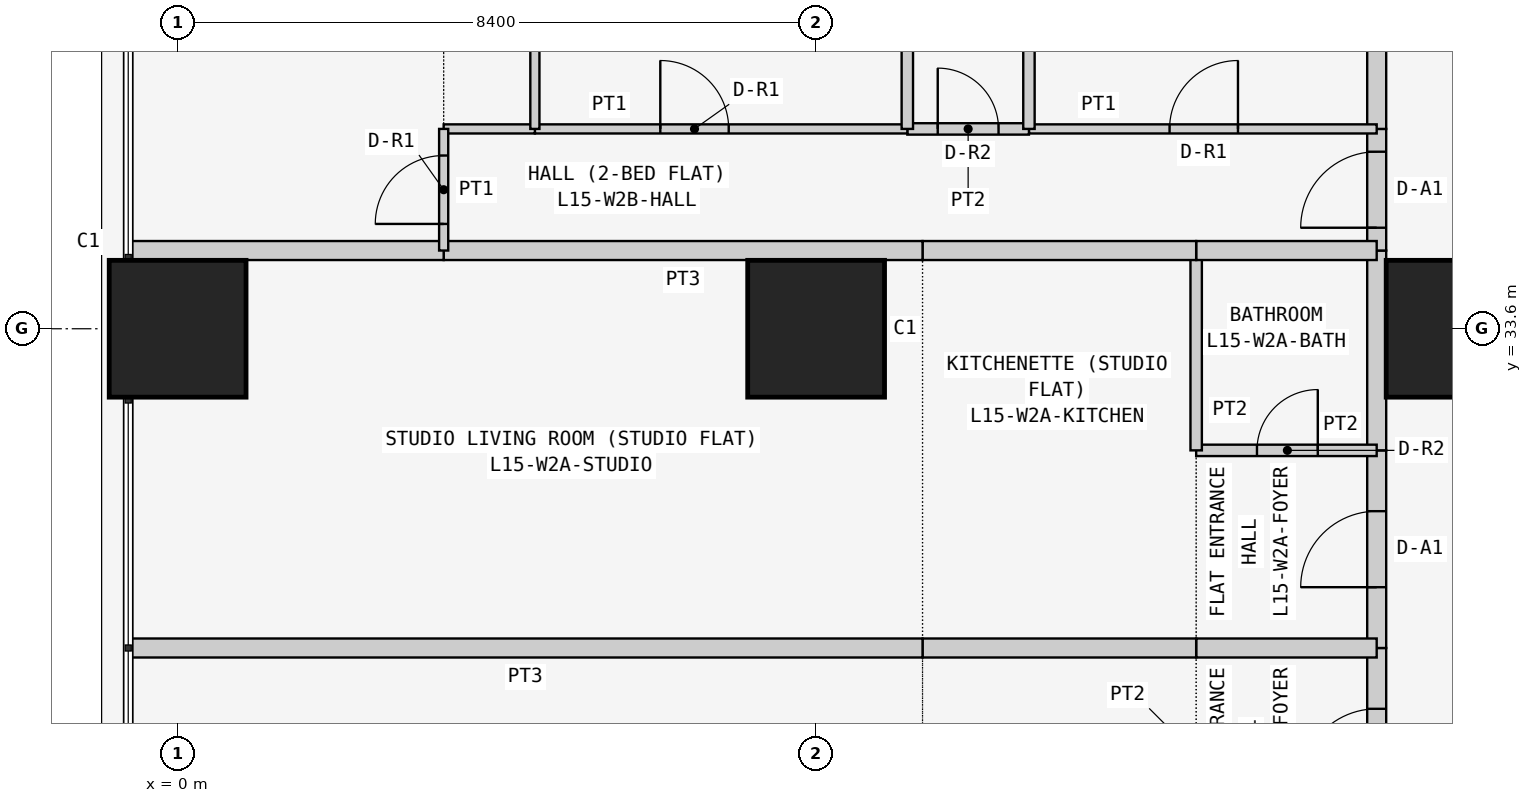
"""IFC4 building model, lengths in metres.
Left out: names, types, materials, properties, quantities, classifications, styles, units other than length and angle.
Written with IfcOpenShell. Run it as: python <this file> out.ifc"""

import sys

from ifc_helpers import new_model, si_unit, direction, frame, frame_2d, origin, origin_2d, place, context, subcontext, project, spatial, rectangle, extrude, element, fill, save


model = new_model("IFC4")
c1 = context("Model", 3, precision=1e-05, world=origin(), true_north=direction((0.0, 1.0)))
c2 = subcontext(c1, "Body", "Model", "MODEL_VIEW")
j1 = project(units=[si_unit("LENGTHUNIT", "METRE"), si_unit("PLANEANGLEUNIT", "RADIAN")], contexts=[c1])
p1 = place(None, origin())
s1 = spatial("IfcSite", under=j1, at=p1, CompositionType="ELEMENT")
p2 = place(p1, origin())
s2 = spatial("IfcBuilding", under=s1, at=p2, CompositionType="ELEMENT")
p3 = place(p2, frame((0.0, 0.0, 63.3)))
s3 = spatial("IfcBuildingStorey", under=s2, at=p3, CompositionType="ELEMENT", Elevation=63.3)
for number, where, z_axis, x_axis in (
    (1, (0.0, 33.6, 0.0), (0.0, 0.0, 1.0), (1.0, 0.0, 0.0)),
    (2, (8.4, 33.6, 0.0), (0.0, 0.0, 1.0), (1.0, 0.0, 0.0)),
    (3, (16.8, 33.6, 0.0), (0.0, 0.0, 1.0), (1.0, 0.0, 0.0)),
):
    element("IfcColumn", number, at=place(p3, frame(where, z_axis=z_axis, x_axis=x_axis)), inside=s3, PredefinedType="COLUMN", context=c2, shape_type="SweptSolid", body=[
        extrude(rectangle(XDim=1.8, YDim=1.8, at=origin_2d()), origin(), (0.0, 0.0, 1.0), 3.6),
    ])
p4 = place(p3, frame((15.775, 26.8, 0.0), z_axis=(0.0, 0.0, 1.0), x_axis=(0.0, 1.0, 0.0)))
e4 = element("IfcWall", 4, at=p4, inside=s3, PredefinedType="PARTITIONING", context=c2, shape_type="SweptSolid", body=[
    extrude(rectangle(XDim=2.6, YDim=0.25, at=frame_2d((1.3, 0.0))), origin(), (0.0, 0.0, 1.0), 3.45),
])
p5 = place(p4, frame((0.8, 0.0, 0.0)))
e5 = element("IfcOpeningElement", 5, at=p5, cuts=e4, PredefinedType="OPENING", context=c2, shape_type="SweptSolid", body=[
    extrude(rectangle(XDim=1.0, YDim=2.1, at=frame_2d((0.5, 1.05))), frame((0.0, 0.135, 0.0), z_axis=(0.0, -1.0, 0.0), x_axis=(1.0, 0.0, 0.0)), (0.0, 0.0, 1.0), 0.27),
])
p6 = place(p3, frame((15.775, 29.4, 0.0), z_axis=(0.0, 0.0, 1.0), x_axis=(0.0, 1.0, 0.0)))
e6 = element("IfcWall", 6, at=p6, inside=s3, PredefinedType="PARTITIONING", context=c2, shape_type="SweptSolid", body=[
    extrude(rectangle(XDim=2.6, YDim=0.25, at=frame_2d((1.3, 0.0))), origin(), (0.0, 0.0, 1.0), 3.45),
])
p7 = place(p6, frame((0.8, 0.0, 0.0)))
e7 = element("IfcOpeningElement", 7, at=p7, cuts=e6, PredefinedType="OPENING", context=c2, shape_type="SweptSolid", body=[
    extrude(rectangle(XDim=1.0, YDim=2.1, at=frame_2d((0.5, 1.05))), frame((0.0, 0.135, 0.0), z_axis=(0.0, -1.0, 0.0), x_axis=(1.0, 0.0, 0.0)), (0.0, 0.0, 1.0), 0.27),
])
p8 = place(p3, frame((15.775, 32.0, 0.0), z_axis=(0.0, 0.0, 1.0), x_axis=(0.0, 1.0, 0.0)))
e8 = element("IfcWall", 8, at=p8, inside=s3, PredefinedType="PARTITIONING", context=c2, shape_type="SweptSolid", body=[
    extrude(rectangle(XDim=2.629, YDim=0.25, at=frame_2d((1.314, 0.0))), origin(), (0.0, 0.0, 1.0), 3.45),
])
p9 = place(p3, frame((15.775, 34.629, 0.0), z_axis=(0.0, 0.0, 1.0), x_axis=(0.0, 1.0, 0.0)))
e9 = element("IfcWall", 9, at=p9, inside=s3, PredefinedType="PARTITIONING", context=c2, shape_type="SweptSolid", body=[
    extrude(rectangle(XDim=1.6, YDim=0.25, at=frame_2d((0.8, 0.0))), origin(), (0.0, 0.0, 1.0), 3.45),
])
p10 = place(p9, frame((0.3, 0.0, 0.0)))
e10 = element("IfcOpeningElement", 10, at=p10, cuts=e9, PredefinedType="OPENING", context=c2, shape_type="SweptSolid", body=[
    extrude(rectangle(XDim=1.0, YDim=2.1, at=frame_2d((0.5, 1.05))), frame((0.0, 0.135, 0.0), z_axis=(0.0, -1.0, 0.0), x_axis=(1.0, 0.0, 0.0)), (0.0, 0.0, 1.0), 0.27),
])
p11 = place(p3, frame((15.775, 36.229, 0.0), z_axis=(0.0, 0.0, 1.0), x_axis=(0.0, 1.0, 0.0)))
e11 = element("IfcWall", 11, at=p11, inside=s3, PredefinedType="PARTITIONING", context=c2, shape_type="SweptSolid", body=[
    extrude(rectangle(XDim=6.471, YDim=0.25, at=frame_2d((3.235, 0.0))), origin(), (0.0, 0.0, 1.0), 3.45),
])
p12 = place(p3, frame((15.775, 29.4, 0.0), z_axis=(0.0, 0.0, 1.0), x_axis=(-1.0, 0.0, 0.0)))
e12 = element("IfcWall", 12, at=p12, inside=s3, PredefinedType="PARTITIONING", context=c2, shape_type="SweptSolid", body=[
    extrude(rectangle(XDim=2.375, YDim=0.25, at=frame_2d((1.188, 0.0))), origin(), (0.0, 0.0, 1.0), 3.45),
])
p13 = place(p3, frame((13.4, 29.4, 0.0), z_axis=(0.0, 0.0, 1.0), x_axis=(-1.0, 0.0, 0.0)))
e13 = element("IfcWall", 13, at=p13, inside=s3, PredefinedType="PARTITIONING", context=c2, shape_type="SweptSolid", body=[
    extrude(rectangle(XDim=3.6, YDim=0.25, at=frame_2d((1.8, 0.0))), origin(), (0.0, 0.0, 1.0), 3.45),
])
p14 = place(p3, frame((9.8, 29.4, 0.0), z_axis=(0.0, 0.0, 1.0), x_axis=(-1.0, 0.0, 0.0)))
e14 = element("IfcWall", 14, at=p14, inside=s3, PredefinedType="PARTITIONING", context=c2, shape_type="SweptSolid", body=[
    extrude(rectangle(XDim=10.45, YDim=0.25, at=frame_2d((5.225, 0.0))), origin(), (0.0, 0.0, 1.0), 3.45),
])
p15 = place(p3, frame((13.4, 32.0, 0.0), z_axis=(0.0, 0.0, 1.0), x_axis=(1.0, 0.0, 0.0)))
e15 = element("IfcWall", 15, at=p15, inside=s3, PredefinedType="PARTITIONING", context=c2, shape_type="SweptSolid", body=[
    extrude(rectangle(XDim=2.375, YDim=0.15, at=frame_2d((1.188, 0.0))), origin(), (0.0, 0.0, 1.0), 3.45),
])
p16 = place(p15, frame((0.8, 0.0, 0.0)))
e16 = element("IfcOpeningElement", 16, at=p16, cuts=e15, PredefinedType="OPENING", context=c2, shape_type="SweptSolid", body=[
    extrude(rectangle(XDim=0.8, YDim=2.1, at=frame_2d((0.4, 1.05))), frame((0.0, 0.085, 0.0), z_axis=(0.0, -1.0, 0.0), x_axis=(1.0, 0.0, 0.0)), (0.0, 0.0, 1.0), 0.17),
])
p17 = place(p3, frame((13.4, 32.0, 0.0), z_axis=(0.0, 0.0, 1.0), x_axis=(0.0, 1.0, 0.0)))
e17 = element("IfcWall", 17, at=p17, inside=s3, PredefinedType="PARTITIONING", context=c2, shape_type="SweptSolid", body=[
    extrude(rectangle(XDim=2.629, YDim=0.15, at=frame_2d((1.314, 0.0))), origin(), (0.0, 0.0, 1.0), 3.45),
])
p18 = place(p3, frame((13.4, 34.629, 0.0), z_axis=(0.0, 0.0, 1.0), x_axis=(1.0, 0.0, 0.0)))
e18 = element("IfcWall", 18, at=p18, inside=s3, PredefinedType="PARTITIONING", context=c2, shape_type="SweptSolid", body=[
    extrude(rectangle(XDim=2.375, YDim=0.25, at=frame_2d((1.188, 0.0))), origin(), (0.0, 0.0, 1.0), 3.45),
])
p19 = place(p3, frame((9.8, 34.629, 0.0), z_axis=(0.0, 0.0, 1.0), x_axis=(1.0, 0.0, 0.0)))
e19 = element("IfcWall", 19, at=p19, inside=s3, PredefinedType="PARTITIONING", context=c2, shape_type="SweptSolid", body=[
    extrude(rectangle(XDim=3.6, YDim=0.25, at=frame_2d((1.8, 0.0))), origin(), (0.0, 0.0, 1.0), 3.45),
])
p20 = place(p3, frame((3.5, 34.629, 0.0), z_axis=(0.0, 0.0, 1.0), x_axis=(1.0, 0.0, 0.0)))
e20 = element("IfcWall", 20, at=p20, inside=s3, PredefinedType="PARTITIONING", context=c2, shape_type="SweptSolid", body=[
    extrude(rectangle(XDim=6.3, YDim=0.25, at=frame_2d((3.15, 0.0))), origin(), (0.0, 0.0, 1.0), 3.45),
])
p21 = place(p3, frame((-0.65, 34.629, 0.0), z_axis=(0.0, 0.0, 1.0), x_axis=(1.0, 0.0, 0.0)))
e21 = element("IfcWall", 21, at=p21, inside=s3, PredefinedType="PARTITIONING", context=c2, shape_type="SweptSolid", body=[
    extrude(rectangle(XDim=4.15, YDim=0.25, at=frame_2d((2.075, 0.0))), origin(), (0.0, 0.0, 1.0), 3.45),
])
p22 = place(p3, frame((11.2, 36.229, 0.0), z_axis=(0.0, 0.0, 1.0), x_axis=(1.0, 0.0, 0.0)))
e22 = element("IfcWall", 22, at=p22, inside=s3, PredefinedType="PARTITIONING", context=c2, shape_type="SweptSolid", body=[
    extrude(rectangle(XDim=4.575, YDim=0.12, at=frame_2d((2.288, 0.0))), origin(), (0.0, 0.0, 1.0), 3.45),
])
p23 = place(p22, frame((1.85, 0.0, 0.0)))
e23 = element("IfcOpeningElement", 23, at=p23, cuts=e22, PredefinedType="OPENING", context=c2, shape_type="SweptSolid", body=[
    extrude(rectangle(XDim=0.9, YDim=2.1, at=frame_2d((0.45, 1.05))), frame((0.0, 0.07, 0.0), z_axis=(0.0, -1.0, 0.0), x_axis=(1.0, 0.0, 0.0)), (0.0, 0.0, 1.0), 0.14),
])
p24 = place(p3, frame((9.6, 36.229, 0.0), z_axis=(0.0, 0.0, 1.0), x_axis=(1.0, 0.0, 0.0)))
e24 = element("IfcWall", 24, at=p24, inside=s3, PredefinedType="PARTITIONING", context=c2, shape_type="SweptSolid", body=[
    extrude(rectangle(XDim=1.6, YDim=0.15, at=frame_2d((0.8, 0.0))), origin(), (0.0, 0.0, 1.0), 3.45),
])
p25 = place(p24, frame((0.4, 0.0, 0.0)))
e25 = element("IfcOpeningElement", 25, at=p25, cuts=e24, PredefinedType="OPENING", context=c2, shape_type="SweptSolid", body=[
    extrude(rectangle(XDim=0.8, YDim=2.1, at=frame_2d((0.4, 1.05))), frame((0.0, 0.085, 0.0), z_axis=(0.0, -1.0, 0.0), x_axis=(1.0, 0.0, 0.0)), (0.0, 0.0, 1.0), 0.17),
])
p26 = place(p3, frame((4.7, 36.229, 0.0), z_axis=(0.0, 0.0, 1.0), x_axis=(1.0, 0.0, 0.0)))
e26 = element("IfcWall", 26, at=p26, inside=s3, PredefinedType="PARTITIONING", context=c2, shape_type="SweptSolid", body=[
    extrude(rectangle(XDim=4.9, YDim=0.12, at=frame_2d((2.45, 0.0))), origin(), (0.0, 0.0, 1.0), 3.45),
])
p27 = place(p26, frame((1.65, 0.0, 0.0)))
e27 = element("IfcOpeningElement", 27, at=p27, cuts=e26, PredefinedType="OPENING", context=c2, shape_type="SweptSolid", body=[
    extrude(rectangle(XDim=0.9, YDim=2.1, at=frame_2d((0.45, 1.05))), frame((0.0, 0.07, 0.0), z_axis=(0.0, -1.0, 0.0), x_axis=(1.0, 0.0, 0.0)), (0.0, 0.0, 1.0), 0.14),
])
p28 = place(p3, frame((3.5, 36.229, 0.0), z_axis=(0.0, 0.0, 1.0), x_axis=(1.0, 0.0, 0.0)))
e28 = element("IfcWall", 28, at=p28, inside=s3, PredefinedType="PARTITIONING", context=c2, shape_type="SweptSolid", body=[
    extrude(rectangle(XDim=1.2, YDim=0.12, at=frame_2d((0.6, 0.0))), origin(), (0.0, 0.0, 1.0), 3.45),
])
p29 = place(p3, frame((3.5, 34.629, 0.0), z_axis=(0.0, 0.0, 1.0), x_axis=(0.0, 1.0, 0.0)))
e29 = element("IfcWall", 29, at=p29, inside=s3, PredefinedType="PARTITIONING", context=c2, shape_type="SweptSolid", body=[
    extrude(rectangle(XDim=1.6, YDim=0.12, at=frame_2d((0.8, 0.0))), origin(), (0.0, 0.0, 1.0), 3.45),
])
p30 = place(p29, frame((0.35, 0.0, 0.0)))
e30 = element("IfcOpeningElement", 30, at=p30, cuts=e29, PredefinedType="OPENING", context=c2, shape_type="SweptSolid", body=[
    extrude(rectangle(XDim=0.9, YDim=2.1, at=frame_2d((0.45, 1.05))), frame((0.0, 0.07, 0.0), z_axis=(0.0, -1.0, 0.0), x_axis=(1.0, 0.0, 0.0)), (0.0, 0.0, 1.0), 0.14),
])
for number, where, z_axis, x_axis in (
    (31, (11.2, 36.229, 0.0), (0.0, 0.0, 1.0), (0.0, 1.0, 0.0)),
    (32, (9.6, 36.229, 0.0), (0.0, 0.0, 1.0), (0.0, 1.0, 0.0)),
):
    element("IfcWall", number, at=place(p3, frame(where, z_axis=z_axis, x_axis=x_axis)), inside=s3, PredefinedType="PARTITIONING", context=c2, shape_type="SweptSolid", body=[
        extrude(rectangle(XDim=6.471, YDim=0.15, at=frame_2d((3.235, 0.0))), origin(), (0.0, 0.0, 1.0), 3.45),
    ])
p31 = place(p3, frame((4.7, 36.229, 0.0), z_axis=(0.0, 0.0, 1.0), x_axis=(0.0, 1.0, 0.0)))
e33 = element("IfcWall", 33, at=p31, inside=s3, PredefinedType="PARTITIONING", context=c2, shape_type="SweptSolid", body=[
    extrude(rectangle(XDim=6.471, YDim=0.12, at=frame_2d((3.235, 0.0))), origin(), (0.0, 0.0, 1.0), 3.45),
])
p32 = place(p5, origin())
e34 = element("IfcDoor", 34, at=p32, inside=s3, OperationType="SINGLE_SWING_LEFT", PredefinedType="DOOR", context=c2, shape_type="SweptSolid", body=[
    extrude(rectangle(XDim=1.0, YDim=2.1, at=frame_2d((0.5, 1.05))), frame((0.0, 0.025, 0.0), z_axis=(0.0, -1.0, 0.0), x_axis=(1.0, 0.0, 0.0)), (0.0, 0.0, 1.0), 0.05),
])
fill(e5, e34)
p33 = place(p7, origin())
e35 = element("IfcDoor", 35, at=p33, inside=s3, OperationType="SINGLE_SWING_LEFT", PredefinedType="DOOR", context=c2, shape_type="SweptSolid", body=[
    extrude(rectangle(XDim=1.0, YDim=2.1, at=frame_2d((0.5, 1.05))), frame((0.0, 0.025, 0.0), z_axis=(0.0, -1.0, 0.0), x_axis=(1.0, 0.0, 0.0)), (0.0, 0.0, 1.0), 0.05),
])
fill(e7, e35)
p34 = place(p16, origin())
e36 = element("IfcDoor", 36, at=p34, inside=s3, OperationType="SINGLE_SWING_RIGHT", PredefinedType="DOOR", context=c2, shape_type="SweptSolid", body=[
    extrude(rectangle(XDim=0.8, YDim=2.1, at=frame_2d((0.4, 1.05))), frame((0.0, 0.025, 0.0), z_axis=(0.0, -1.0, 0.0), x_axis=(1.0, 0.0, 0.0)), (0.0, 0.0, 1.0), 0.05),
])
fill(e16, e36)
p35 = place(p10, origin())
e37 = element("IfcDoor", 37, at=p35, inside=s3, OperationType="SINGLE_SWING_LEFT", PredefinedType="DOOR", context=c2, shape_type="SweptSolid", body=[
    extrude(rectangle(XDim=1.0, YDim=2.1, at=frame_2d((0.5, 1.05))), frame((0.0, 0.025, 0.0), z_axis=(0.0, -1.0, 0.0), x_axis=(1.0, 0.0, 0.0)), (0.0, 0.0, 1.0), 0.05),
])
fill(e10, e37)
p36 = place(p23, origin())
e38 = element("IfcDoor", 38, at=p36, inside=s3, OperationType="SINGLE_SWING_RIGHT", PredefinedType="DOOR", context=c2, shape_type="SweptSolid", body=[
    extrude(rectangle(XDim=0.9, YDim=2.1, at=frame_2d((0.45, 1.05))), frame((0.0, 0.025, 0.0), z_axis=(0.0, -1.0, 0.0), x_axis=(1.0, 0.0, 0.0)), (0.0, 0.0, 1.0), 0.05),
])
fill(e23, e38)
p37 = place(p25, origin())
e39 = element("IfcDoor", 39, at=p37, inside=s3, OperationType="SINGLE_SWING_LEFT", PredefinedType="DOOR", context=c2, shape_type="SweptSolid", body=[
    extrude(rectangle(XDim=0.8, YDim=2.1, at=frame_2d((0.4, 1.05))), frame((0.0, 0.025, 0.0), z_axis=(0.0, -1.0, 0.0), x_axis=(1.0, 0.0, 0.0)), (0.0, 0.0, 1.0), 0.05),
])
fill(e25, e39)
p38 = place(p27, origin())
e40 = element("IfcDoor", 40, at=p38, inside=s3, OperationType="SINGLE_SWING_LEFT", PredefinedType="DOOR", context=c2, shape_type="SweptSolid", body=[
    extrude(rectangle(XDim=0.9, YDim=2.1, at=frame_2d((0.45, 1.05))), frame((0.0, 0.025, 0.0), z_axis=(0.0, -1.0, 0.0), x_axis=(1.0, 0.0, 0.0)), (0.0, 0.0, 1.0), 0.05),
])
fill(e27, e40)
p39 = place(p30, origin())
e41 = element("IfcDoor", 41, at=p39, inside=s3, OperationType="SINGLE_SWING_LEFT", PredefinedType="DOOR", context=c2, shape_type="SweptSolid", body=[
    extrude(rectangle(XDim=0.9, YDim=2.1, at=frame_2d((0.45, 1.05))), frame((0.0, 0.025, 0.0), z_axis=(0.0, -1.0, 0.0), x_axis=(1.0, 0.0, 0.0)), (0.0, 0.0, 1.0), 0.05),
])
fill(e30, e41)
save(model, sys.argv[1])
